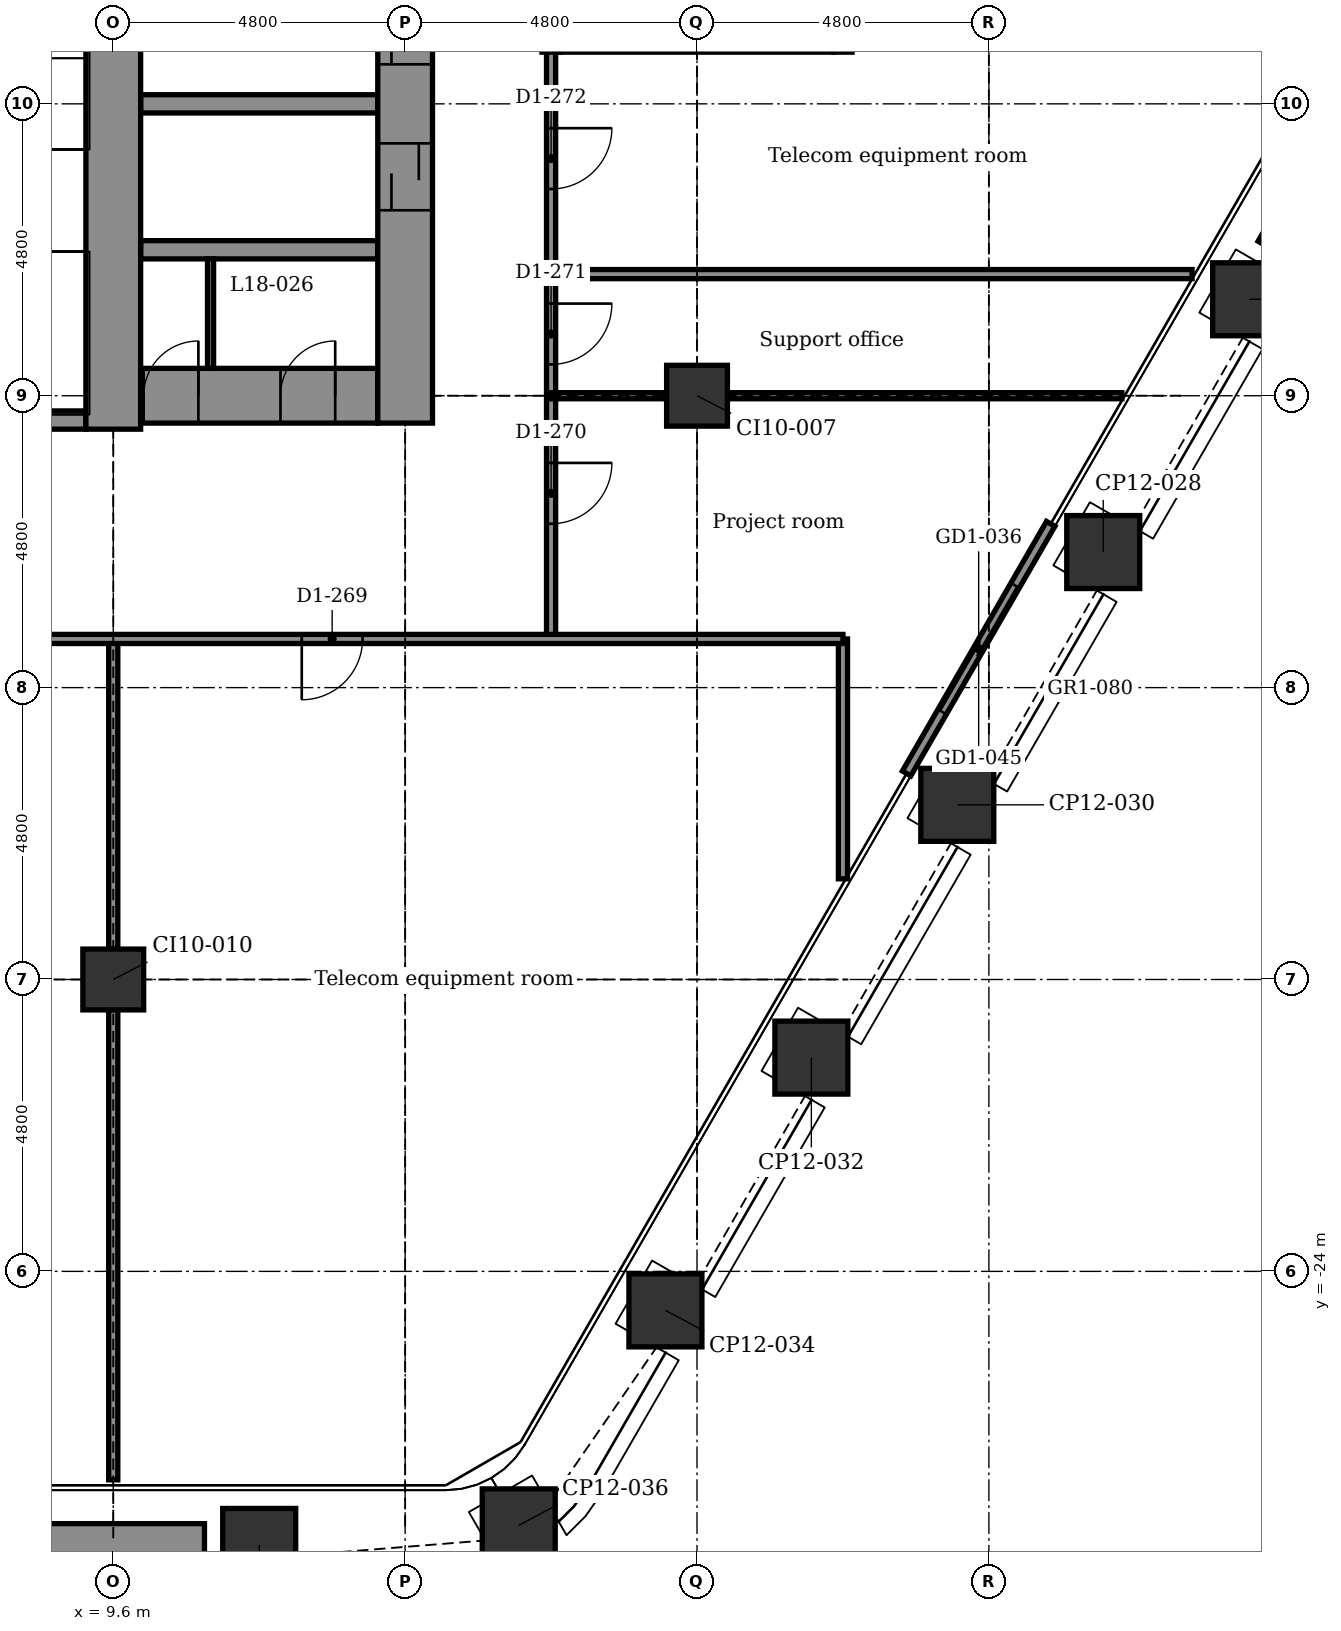
"""IFC4 building model, lengths in metres.
Left out: names, types, materials, properties, quantities, classifications, styles, units other than length and angle.
Written with IfcOpenShell. Run it as: python <this file> out.ifc"""

import sys

from ifc_helpers import new_model, si_unit, direction, frame, frame_2d, origin, origin_2d, place, context, subcontext, project, spatial, rectangle, extrude, element, fill, save


model = new_model("IFC4")
c1 = context("Model", 3, precision=1e-05, world=origin(), true_north=direction((0.0, 1.0)))
c2 = subcontext(c1, "Body", "Model", "MODEL_VIEW")
j1 = project(units=[si_unit("LENGTHUNIT", "METRE"), si_unit("PLANEANGLEUNIT", "RADIAN")], contexts=[c1])
p1 = place(None, origin())
s1 = spatial("IfcSite", under=j1, at=p1, CompositionType="ELEMENT")
p2 = place(p1, origin())
s2 = spatial("IfcBuilding", under=s1, at=p2, CompositionType="ELEMENT")
p3 = place(p2, frame((0.0, 0.0, 95.9)))
s3 = spatial("IfcBuildingStorey", under=s2, at=p3, CompositionType="ELEMENT", Elevation=95.9)
for number, where, z_axis, x_axis in (
    (1, (28.28, -8.014, -0.2), (0.0, 0.0, 1.0), (0.5, 0.866, 0.0)),
    (2, (25.88, -12.171, -0.2), (0.0, 0.0, 1.0), (0.5, 0.866, 0.0)),
    (3, (23.48, -16.328, -0.2), (0.0, 0.0, 1.0), (0.5, 0.866, 0.0)),
    (4, (21.08, -20.485, -0.2), (0.0, 0.0, 1.0), (0.5, 0.866, 0.0)),
    (5, (18.68, -24.642, -0.2), (0.0, 0.0, 1.0), (0.5, 0.866, 0.0)),
    (6, (16.268, -28.177, -0.2), (0.0, 0.0, 1.0), (0.866, 0.5, 0.0)),
    (7, (12.0, -28.499, -0.2), (0.0, 0.0, 1.0), (1.0, 0.0, 0.0)),
):
    element("IfcColumn", number, at=place(p3, frame(where, z_axis=z_axis, x_axis=x_axis)), inside=s3, PredefinedType="COLUMN", context=c2, shape_type="SweptSolid", body=[
        extrude(rectangle(XDim=1.2, YDim=1.2, at=origin_2d()), origin(), (0.0, 0.0, 1.0), 4.5),
    ])
for number, where, z_axis, x_axis in (
    (8, (9.6, -19.2, -0.2), (0.0, 0.0, 1.0), (1.0, 0.0, 0.0)),
    (9, (19.2, -9.6, -0.2), (0.0, 0.0, 1.0), (1.0, 0.0, 0.0)),
):
    element("IfcColumn", number, at=place(p3, frame(where, z_axis=z_axis, x_axis=x_axis)), inside=s3, PredefinedType="COLUMN", context=c2, shape_type="SweptSolid", body=[
        extrude(rectangle(XDim=1.0, YDim=1.0, at=origin_2d()), origin(), (0.0, 0.0, 1.0), 4.5),
    ])
p4 = place(p3, frame((4.95, -10.0, -0.2), z_axis=(0.0, 0.0, 1.0), x_axis=(1.0, 0.0, 0.0)))
e10 = element("IfcWall", 10, at=p4, inside=s3, PredefinedType="STANDARD", context=c2, shape_type="SweptSolid", body=[
    extrude(rectangle(XDim=4.2, YDim=0.3, at=frame_2d((2.1, 0.0))), origin(), (0.0, 0.0, 1.0), 4.5),
])
p5 = place(p3, frame((10.05, -9.6, -0.2), z_axis=(0.0, 0.0, 1.0), x_axis=(1.0, 0.0, 0.0)))
e11 = element("IfcWall", 11, at=p5, inside=s3, PredefinedType="SHEAR", context=c2, shape_type="SweptSolid", body=[
    extrude(rectangle(XDim=3.9, YDim=0.9, at=frame_2d((1.95, 0.0))), origin(), (0.0, 0.0, 1.0), 4.5),
])
p6 = place(p5, frame((0.05, 0.0, 0.2)))
e12 = element("IfcOpeningElement", 12, at=p6, cuts=e11, PredefinedType="OPENING", context=c2, shape_type="SweptSolid", body=[
    extrude(rectangle(XDim=0.9, YDim=2.1, at=frame_2d((0.45, 1.05))), frame((0.0, 0.46, 0.0), z_axis=(0.0, -1.0, 0.0), x_axis=(1.0, 0.0, 0.0)), (0.0, 0.0, 1.0), 0.92),
])
p7 = place(p5, frame((2.3, 0.0, 0.2)))
e13 = element("IfcOpeningElement", 13, at=p7, cuts=e11, PredefinedType="OPENING", context=c2, shape_type="SweptSolid", body=[
    extrude(rectangle(XDim=0.9, YDim=2.1, at=frame_2d((0.45, 1.05))), frame((0.0, 0.46, 0.0), z_axis=(0.0, -1.0, 0.0), x_axis=(1.0, 0.0, 0.0)), (0.0, 0.0, 1.0), 0.92),
])
for number, where, z_axis, x_axis in (
    (14, (10.05, -7.2, -0.2), (0.0, 0.0, 1.0), (1.0, 0.0, 0.0)),
    (15, (10.05, -4.8, -0.2), (0.0, 0.0, 1.0), (1.0, 0.0, 0.0)),
):
    element("IfcWall", number, at=place(p3, frame(where, z_axis=z_axis, x_axis=x_axis)), inside=s3, PredefinedType="STANDARD", context=c2, shape_type="SweptSolid", body=[
        extrude(rectangle(XDim=3.9, YDim=0.3, at=frame_2d((1.95, 0.0))), origin(), (0.0, 0.0, 1.0), 4.5),
    ])
p8 = place(p3, frame((16.95, -3.8, -0.2), z_axis=(0.0, 0.0, 1.0), x_axis=(1.0, 0.0, 0.0)))
e16 = element("IfcWall", 16, at=p8, inside=s3, PredefinedType="STANDARD", context=c2, shape_type="SweptSolid", body=[
    extrude(rectangle(XDim=4.5, YDim=0.3, at=frame_2d((2.25, 0.0))), origin(), (0.0, 0.0, 1.0), 4.5),
])
p9 = place(p3, frame((9.6, -10.15, -0.2), z_axis=(0.0, 0.0, 1.0), x_axis=(0.0, 1.0, 0.0)))
e17 = element("IfcWall", 17, at=p9, inside=s3, PredefinedType="SHEAR", context=c2, shape_type="SweptSolid", body=[
    extrude(rectangle(XDim=20.2, YDim=0.9, at=frame_2d((10.1, 0.0))), origin(), (0.0, 0.0, 1.0), 4.5),
])
p10 = place(p3, frame((14.4, -10.05, -0.2), z_axis=(0.0, 0.0, 1.0), x_axis=(0.0, 1.0, 0.0)))
e18 = element("IfcWall", 18, at=p10, inside=s3, PredefinedType="SHEAR", context=c2, shape_type="SweptSolid", body=[
    extrude(rectangle(XDim=20.1, YDim=0.9, at=frame_2d((10.05, 0.0))), origin(), (0.0, 0.0, 1.0), 4.5),
])
p11 = place(p10, frame((3.5, 0.0, 0.2)))
e19 = element("IfcOpeningElement", 19, at=p11, cuts=e18, PredefinedType="OPENING", context=c2, shape_type="SweptSolid", body=[
    extrude(rectangle(XDim=1.1, YDim=2.1, at=frame_2d((0.55, 1.05))), frame((0.0, 0.46, 0.0), z_axis=(0.0, -1.0, 0.0), x_axis=(1.0, 0.0, 0.0)), (0.0, 0.0, 1.0), 0.92),
])
p12 = place(p10, frame((5.9, 0.0, 0.2)))
e20 = element("IfcOpeningElement", 20, at=p12, cuts=e18, PredefinedType="OPENING", context=c2, shape_type="SweptSolid", body=[
    extrude(rectangle(XDim=1.1, YDim=2.1, at=frame_2d((0.55, 1.05))), frame((0.0, 0.46, 0.0), z_axis=(0.0, -1.0, 0.0), x_axis=(1.0, 0.0, 0.0)), (0.0, 0.0, 1.0), 0.92),
])
p13 = place(p10, frame((8.3, 0.0, 0.2)))
e21 = element("IfcOpeningElement", 21, at=p13, cuts=e18, PredefinedType="OPENING", context=c2, shape_type="SweptSolid", body=[
    extrude(rectangle(XDim=1.1, YDim=2.1, at=frame_2d((0.55, 1.05))), frame((0.0, 0.46, 0.0), z_axis=(0.0, -1.0, 0.0), x_axis=(1.0, 0.0, 0.0)), (0.0, 0.0, 1.0), 0.92),
])
p14 = place(p10, frame((10.7, 0.0, 0.2)))
e22 = element("IfcOpeningElement", 22, at=p14, cuts=e18, PredefinedType="OPENING", context=c2, shape_type="SweptSolid", body=[
    extrude(rectangle(XDim=1.1, YDim=2.1, at=frame_2d((0.55, 1.05))), frame((0.0, 0.46, 0.0), z_axis=(0.0, -1.0, 0.0), x_axis=(1.0, 0.0, 0.0)), (0.0, 0.0, 1.0), 0.92),
])
p15 = place(p3, frame((25.017, -11.707, 0.0), z_axis=(0.0, 0.0, 1.0), x_axis=(-0.499978080042, -0.866038058908, 0.0)))
e23 = element("IfcWall", 23, at=p15, inside=s3, PredefinedType="PARTITIONING", context=c2, shape_type="SweptSolid", body=[
    extrude(rectangle(XDim=4.74, YDim=0.16, at=frame_2d((2.37, 0.0))), origin(), (0.0, 0.0, 1.0), 4.3),
])
p16 = place(p15, frame((1.17, 0.0, 0.0)))
e24 = element("IfcOpeningElement", 24, at=p16, cuts=e23, PredefinedType="OPENING", context=c2, shape_type="SweptSolid", body=[
    extrude(rectangle(XDim=2.4, YDim=2.4, at=frame_2d((1.2, 1.2))), frame((0.0, 0.09, 0.0), z_axis=(0.0, -1.0, 0.0), x_axis=(1.0, 0.0, 0.0)), (0.0, 0.0, 1.0), 0.18),
])
for number, where, z_axis, x_axis in (
    (25, (30.187, -4.611, 0.0), (0.0, 0.0, 1.0), (-0.5, -0.866, 0.0)),
    (26, (11.1, -28.448, 0.0), (0.0, 0.0, 1.0), (-1.0, 0.0, 0.0)),
):
    element("IfcWall", number, at=place(p3, frame(where, z_axis=z_axis, x_axis=x_axis)), inside=s3, PredefinedType="USERDEFINED", context=c2, shape_type="SweptSolid", body=[
        extrude(rectangle(XDim=3.0, YDim=0.6, at=frame_2d((1.5, 0.0))), origin(), (0.0, 0.0, 1.0), 0.7),
    ])
p17 = place(p3, frame((21.6, -17.545, 0.0), z_axis=(0.0, 0.0, 1.0), x_axis=(0.0, 1.0, 0.0)))
e27 = element("IfcWall", 27, at=p17, inside=s3, PredefinedType="PARTITIONING", context=c2, shape_type="SweptSolid", body=[
    extrude(rectangle(XDim=3.945, YDim=0.15, at=frame_2d((1.972, 0.0))), origin(), (0.0, 0.0, 1.0), 4.3),
])
p18 = place(p3, frame((16.8, -13.6, 0.0), z_axis=(0.0, 0.0, 1.0), x_axis=(0.0, 1.0, 0.0)))
e28 = element("IfcWall", 28, at=p18, inside=s3, PredefinedType="PARTITIONING", context=c2, shape_type="SweptSolid", body=[
    extrude(rectangle(XDim=9.65, YDim=0.15, at=frame_2d((4.825, 0.0))), origin(), (0.0, 0.0, 1.0), 4.3),
])
p19 = place(p18, frame((1.895, 0.0, 0.0)))
e29 = element("IfcOpeningElement", 29, at=p19, cuts=e28, PredefinedType="OPENING", context=c2, shape_type="SweptSolid", body=[
    extrude(rectangle(XDim=1.0, YDim=2.1, at=frame_2d((0.5, 1.05))), frame((0.0, 0.085, 0.0), z_axis=(0.0, -1.0, 0.0), x_axis=(1.0, 0.0, 0.0)), (0.0, 0.0, 1.0), 0.17),
])
p20 = place(p18, frame((4.515, 0.0, 0.0)))
e30 = element("IfcOpeningElement", 30, at=p20, cuts=e28, PredefinedType="OPENING", context=c2, shape_type="SweptSolid", body=[
    extrude(rectangle(XDim=1.0, YDim=2.1, at=frame_2d((0.5, 1.05))), frame((0.0, 0.085, 0.0), z_axis=(0.0, -1.0, 0.0), x_axis=(1.0, 0.0, 0.0)), (0.0, 0.0, 1.0), 0.17),
])
p21 = place(p18, frame((7.4, 0.0, 0.0)))
e31 = element("IfcOpeningElement", 31, at=p21, cuts=e28, PredefinedType="OPENING", context=c2, shape_type="SweptSolid", body=[
    extrude(rectangle(XDim=1.0, YDim=2.1, at=frame_2d((0.5, 1.05))), frame((0.0, 0.085, 0.0), z_axis=(0.0, -1.0, 0.0), x_axis=(1.0, 0.0, 0.0)), (0.0, 0.0, 1.0), 0.17),
])
p22 = place(p3, frame((11.2, -9.15, 0.0), z_axis=(0.0, 0.0, 1.0), x_axis=(0.0, 1.0, 0.0)))
e32 = element("IfcWall", 32, at=p22, inside=s3, PredefinedType="PARTITIONING", context=c2, shape_type="SweptSolid", body=[
    extrude(rectangle(XDim=1.8, YDim=0.1, at=frame_2d((0.9, 0.0))), origin(), (0.0, 0.0, 1.0), 4.3),
])
p23 = place(p3, frame((9.6, -27.428, 0.0), z_axis=(0.0, 0.0, 1.0), x_axis=(0.0, 1.0, 0.0)))
e33 = element("IfcWall", 33, at=p23, inside=s3, PredefinedType="PARTITIONING", context=c2, shape_type="SweptSolid", body=[
    extrude(rectangle(XDim=7.729, YDim=0.15, at=frame_2d((3.864, 0.0))), origin(), (0.0, 0.0, 1.0), 3.843),
])
p24 = place(p3, frame((9.6, -18.7, 0.0), z_axis=(0.0, 0.0, 1.0), x_axis=(0.0, 1.0, 0.0)))
e34 = element("IfcWall", 34, at=p24, inside=s3, PredefinedType="PARTITIONING", context=c2, shape_type="SweptSolid", body=[
    extrude(rectangle(XDim=5.1, YDim=0.15, at=frame_2d((2.55, 0.0))), origin(), (0.0, 0.0, 1.0), 3.843),
])
p25 = place(p3, frame((-16.8, -13.6, 0.0), z_axis=(0.0, 0.0, 1.0), x_axis=(1.0, 0.0, 0.0)))
e35 = element("IfcWall", 35, at=p25, inside=s3, PredefinedType="PARTITIONING", context=c2, shape_type="SweptSolid", body=[
    extrude(rectangle(XDim=38.4, YDim=0.15, at=frame_2d((19.2, 0.0))), origin(), (0.0, 0.0, 1.0), 4.3),
])
p26 = place(p25, frame((0.7, 0.0, 0.0)))
e36 = element("IfcOpeningElement", 36, at=p26, cuts=e35, PredefinedType="OPENING", context=c2, shape_type="SweptSolid", body=[
    extrude(rectangle(XDim=1.0, YDim=2.1, at=frame_2d((0.5, 1.05))), frame((0.0, 0.085, 0.0), z_axis=(0.0, -1.0, 0.0), x_axis=(1.0, 0.0, 0.0)), (0.0, 0.0, 1.0), 0.17),
])
p27 = place(p25, frame((5.025, 0.0, 0.0)))
e37 = element("IfcOpeningElement", 37, at=p27, cuts=e35, PredefinedType="OPENING", context=c2, shape_type="SweptSolid", body=[
    extrude(rectangle(XDim=1.0, YDim=2.1, at=frame_2d((0.5, 1.05))), frame((0.0, 0.085, 0.0), z_axis=(0.0, -1.0, 0.0), x_axis=(1.0, 0.0, 0.0)), (0.0, 0.0, 1.0), 0.17),
])
p28 = place(p25, frame((9.1, 0.0, 0.0)))
e38 = element("IfcOpeningElement", 38, at=p28, cuts=e35, PredefinedType="OPENING", context=c2, shape_type="SweptSolid", body=[
    extrude(rectangle(XDim=1.0, YDim=2.1, at=frame_2d((0.5, 1.05))), frame((0.0, 0.085, 0.0), z_axis=(0.0, -1.0, 0.0), x_axis=(1.0, 0.0, 0.0)), (0.0, 0.0, 1.0), 0.17),
])
p29 = place(p25, frame((12.7, 0.0, 0.0)))
e39 = element("IfcOpeningElement", 39, at=p29, cuts=e35, PredefinedType="OPENING", context=c2, shape_type="SweptSolid", body=[
    extrude(rectangle(XDim=1.0, YDim=2.1, at=frame_2d((0.5, 1.05))), frame((0.0, 0.085, 0.0), z_axis=(0.0, -1.0, 0.0), x_axis=(1.0, 0.0, 0.0)), (0.0, 0.0, 1.0), 0.17),
])
p30 = place(p25, frame((15.1, 0.0, 0.0)))
e40 = element("IfcOpeningElement", 40, at=p30, cuts=e35, PredefinedType="OPENING", context=c2, shape_type="SweptSolid", body=[
    extrude(rectangle(XDim=1.0, YDim=2.1, at=frame_2d((0.5, 1.05))), frame((0.0, 0.085, 0.0), z_axis=(0.0, -1.0, 0.0), x_axis=(1.0, 0.0, 0.0)), (0.0, 0.0, 1.0), 0.17),
])
p31 = place(p25, frame((24.015, 0.0, 0.0)))
e41 = element("IfcOpeningElement", 41, at=p31, cuts=e35, PredefinedType="OPENING", context=c2, shape_type="SweptSolid", body=[
    extrude(rectangle(XDim=1.0, YDim=2.1, at=frame_2d((0.5, 1.05))), frame((0.0, 0.085, 0.0), z_axis=(0.0, -1.0, 0.0), x_axis=(1.0, 0.0, 0.0)), (0.0, 0.0, 1.0), 0.17),
])
p32 = place(p25, frame((29.5, 0.0, 0.0)))
e42 = element("IfcOpeningElement", 42, at=p32, cuts=e35, PredefinedType="OPENING", context=c2, shape_type="SweptSolid", body=[
    extrude(rectangle(XDim=1.0, YDim=2.1, at=frame_2d((0.5, 1.05))), frame((0.0, 0.085, 0.0), z_axis=(0.0, -1.0, 0.0), x_axis=(1.0, 0.0, 0.0)), (0.0, 0.0, 1.0), 0.17),
])
p33 = place(p25, frame((18.75, 0.0, 0.0)))
e43 = element("IfcOpeningElement", 43, at=p33, cuts=e35, PredefinedType="OPENING", context=c2, shape_type="SweptSolid", body=[
    extrude(rectangle(XDim=0.9, YDim=2.1, at=frame_2d((0.45, 1.05))), frame((0.0, 0.085, 0.0), z_axis=(0.0, -1.0, 0.0), x_axis=(1.0, 0.0, 0.0)), (0.0, 0.0, 1.0), 0.17),
])
p34 = place(p25, frame((21.75, 0.0, 0.0)))
e44 = element("IfcOpeningElement", 44, at=p34, cuts=e35, PredefinedType="OPENING", context=c2, shape_type="SweptSolid", body=[
    extrude(rectangle(XDim=0.9, YDim=2.1, at=frame_2d((0.45, 1.05))), frame((0.0, 0.085, 0.0), z_axis=(0.0, -1.0, 0.0), x_axis=(1.0, 0.0, 0.0)), (0.0, 0.0, 1.0), 0.17),
])
p35 = place(p3, frame((16.8, -9.6, 0.0), z_axis=(0.0, 0.0, 1.0), x_axis=(1.0, 0.0, 0.0)))
e45 = element("IfcWall", 45, at=p35, inside=s3, PredefinedType="PARTITIONING", context=c2, shape_type="SweptSolid", body=[
    extrude(rectangle(XDim=1.9, YDim=0.1, at=frame_2d((0.95, 0.0))), origin(), (0.0, 0.0, 1.0), 3.692),
])
p36 = place(p3, frame((19.7, -9.6, 0.0), z_axis=(0.0, 0.0, 1.0), x_axis=(1.0, 0.0, 0.0)))
e46 = element("IfcWall", 46, at=p36, inside=s3, PredefinedType="PARTITIONING", context=c2, shape_type="SweptSolid", body=[
    extrude(rectangle(XDim=6.487, YDim=0.1, at=frame_2d((3.243, 0.0))), origin(), (0.0, 0.0, 1.0), 3.692),
])
p37 = place(p3, frame((16.8, -7.6, 0.0), z_axis=(0.0, 0.0, 1.0), x_axis=(1.0, 0.0, 0.0)))
e47 = element("IfcWall", 47, at=p37, inside=s3, PredefinedType="PARTITIONING", context=c2, shape_type="SweptSolid", body=[
    extrude(rectangle(XDim=10.542, YDim=0.15, at=frame_2d((5.271, 0.0))), origin(), (0.0, 0.0, 1.0), 4.3),
])
p38 = place(p16, origin())
e48 = element("IfcDoor", 48, at=p38, inside=s3, OperationType="DOUBLE_DOOR_SLIDING", PredefinedType="DOOR", context=c2, shape_type="SweptSolid", body=[
    extrude(rectangle(XDim=2.4, YDim=2.4, at=frame_2d((1.2, 1.2))), frame((0.0, 0.025, 0.0), z_axis=(0.0, -1.0, 0.0), x_axis=(1.0, 0.0, 0.0)), (0.0, 0.0, 1.0), 0.05),
])
fill(e24, e48)
p39 = place(p32, frame((1.0, 0.0, 0.0), z_axis=(0.0, 0.0, 1.0), x_axis=(-1.0, 0.0, 0.0)))
e49 = element("IfcDoor", 49, at=p39, inside=s3, OperationType="SINGLE_SWING_LEFT", PredefinedType="DOOR", context=c2, shape_type="SweptSolid", body=[
    extrude(rectangle(XDim=1.0, YDim=2.1, at=frame_2d((0.5, 1.05))), frame((0.0, 0.025, 0.0), z_axis=(0.0, -1.0, 0.0), x_axis=(1.0, 0.0, 0.0)), (0.0, 0.0, 1.0), 0.05),
])
fill(e42, e49)
p40 = place(p19, frame((1.0, 0.0, 0.0), z_axis=(0.0, 0.0, 1.0), x_axis=(-1.0, 0.0, 0.0)))
e50 = element("IfcDoor", 50, at=p40, inside=s3, OperationType="SINGLE_SWING_RIGHT", PredefinedType="DOOR", context=c2, shape_type="SweptSolid", body=[
    extrude(rectangle(XDim=1.0, YDim=2.1, at=frame_2d((0.5, 1.05))), frame((0.0, 0.025, 0.0), z_axis=(0.0, -1.0, 0.0), x_axis=(1.0, 0.0, 0.0)), (0.0, 0.0, 1.0), 0.05),
])
fill(e29, e50)
p41 = place(p20, frame((1.0, 0.0, 0.0), z_axis=(0.0, 0.0, 1.0), x_axis=(-1.0, 0.0, 0.0)))
e51 = element("IfcDoor", 51, at=p41, inside=s3, OperationType="SINGLE_SWING_RIGHT", PredefinedType="DOOR", context=c2, shape_type="SweptSolid", body=[
    extrude(rectangle(XDim=1.0, YDim=2.1, at=frame_2d((0.5, 1.05))), frame((0.0, 0.025, 0.0), z_axis=(0.0, -1.0, 0.0), x_axis=(1.0, 0.0, 0.0)), (0.0, 0.0, 1.0), 0.05),
])
fill(e30, e51)
p42 = place(p21, frame((1.0, 0.0, 0.0), z_axis=(0.0, 0.0, 1.0), x_axis=(-1.0, 0.0, 0.0)))
e52 = element("IfcDoor", 52, at=p42, inside=s3, OperationType="SINGLE_SWING_RIGHT", PredefinedType="DOOR", context=c2, shape_type="SweptSolid", body=[
    extrude(rectangle(XDim=1.0, YDim=2.1, at=frame_2d((0.5, 1.05))), frame((0.0, 0.025, 0.0), z_axis=(0.0, -1.0, 0.0), x_axis=(1.0, 0.0, 0.0)), (0.0, 0.0, 1.0), 0.05),
])
fill(e31, e52)
p43 = place(p11, origin())
e53 = element("IfcDoor", 53, at=p43, inside=s3, OperationType="DOUBLE_DOOR_SLIDING", PredefinedType="DOOR", context=c2, shape_type="SweptSolid", body=[
    extrude(rectangle(XDim=1.1, YDim=2.1, at=frame_2d((0.55, 1.05))), frame((0.0, 0.025, 0.0), z_axis=(0.0, -1.0, 0.0), x_axis=(1.0, 0.0, 0.0)), (0.0, 0.0, 1.0), 0.05),
])
fill(e19, e53)
p44 = place(p12, origin())
e54 = element("IfcDoor", 54, at=p44, inside=s3, OperationType="DOUBLE_DOOR_SLIDING", PredefinedType="DOOR", context=c2, shape_type="SweptSolid", body=[
    extrude(rectangle(XDim=1.1, YDim=2.1, at=frame_2d((0.55, 1.05))), frame((0.0, 0.025, 0.0), z_axis=(0.0, -1.0, 0.0), x_axis=(1.0, 0.0, 0.0)), (0.0, 0.0, 1.0), 0.05),
])
fill(e20, e54)
p45 = place(p6, origin())
e55 = element("IfcDoor", 55, at=p45, inside=s3, OperationType="SINGLE_SWING_RIGHT", PredefinedType="DOOR", context=c2, shape_type="SweptSolid", body=[
    extrude(rectangle(XDim=0.9, YDim=2.1, at=frame_2d((0.45, 1.05))), frame((0.0, 0.025, 0.0), z_axis=(0.0, -1.0, 0.0), x_axis=(1.0, 0.0, 0.0)), (0.0, 0.0, 1.0), 0.05),
])
fill(e12, e55)
p46 = place(p7, origin())
e56 = element("IfcDoor", 56, at=p46, inside=s3, OperationType="SINGLE_SWING_RIGHT", PredefinedType="DOOR", context=c2, shape_type="SweptSolid", body=[
    extrude(rectangle(XDim=0.9, YDim=2.1, at=frame_2d((0.45, 1.05))), frame((0.0, 0.025, 0.0), z_axis=(0.0, -1.0, 0.0), x_axis=(1.0, 0.0, 0.0)), (0.0, 0.0, 1.0), 0.05),
])
fill(e13, e56)
save(model, sys.argv[1])
